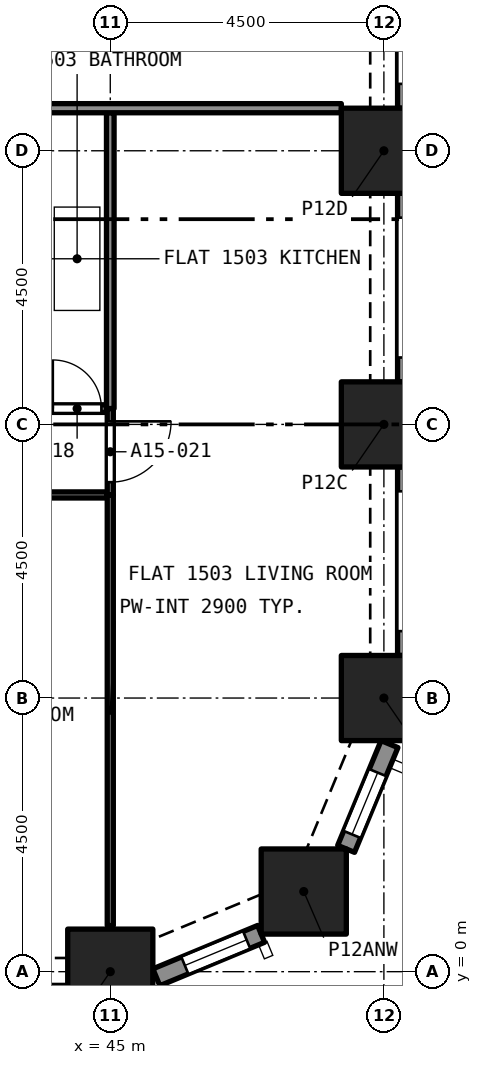
"""IFC4 building model, lengths in metres.
Left out: names, types, materials, properties, quantities, classifications, styles, units other than length and angle.
Written with IfcOpenShell. Run it as: python <this file> out.ifc"""

import sys

from ifc_helpers import new_model, si_unit, direction, frame, frame_2d, origin, origin_2d, place, context, subcontext, project, spatial, rectangle, extrude, element, fill, save


model = new_model("IFC4")
c1 = context("Model", 3, precision=1e-05, world=origin(), true_north=direction((0.0, 1.0)))
c2 = subcontext(c1, "Body", "Model", "MODEL_VIEW")
j1 = project(units=[si_unit("LENGTHUNIT", "METRE"), si_unit("PLANEANGLEUNIT", "RADIAN")], contexts=[c1])
p1 = place(None, origin())
s1 = spatial("IfcSite", under=j1, at=p1, CompositionType="ELEMENT")
p2 = place(p1, origin())
s2 = spatial("IfcBuilding", under=s1, at=p2, CompositionType="ELEMENT")
p3 = place(p2, frame((0.0, 0.0, 59.2)))
s3 = spatial("IfcBuildingStorey", under=s2, at=p3, CompositionType="ELEMENT", Elevation=59.2)
for number, where, z_axis, x_axis in (
    (1, (45.0, 0.0, 0.0), (0.0, 0.0, 1.0), (1.0, 0.0, 0.0)),
    (2, (48.182, 1.318, 0.0), (0.0, 0.0, 1.0), (1.0, 0.0, 0.0)),
    (3, (49.5, 4.5, 0.0), (0.0, 0.0, 1.0), (1.0, 0.0, 0.0)),
    (4, (49.5, 9.0, 0.0), (0.0, 0.0, 1.0), (1.0, 0.0, 0.0)),
    (5, (49.5, 13.5, 0.0), (0.0, 0.0, 1.0), (1.0, 0.0, 0.0)),
):
    element("IfcColumn", number, at=place(p3, frame(where, z_axis=z_axis, x_axis=x_axis)), inside=s3, PredefinedType="COLUMN", context=c2, shape_type="SweptSolid", body=[
        extrude(rectangle(XDim=1.4, YDim=1.4, at=origin_2d()), origin(), (0.0, 0.0, 1.0), 3.2),
    ])
p4 = place(p3, frame((47.48, 0.622, 0.0), z_axis=(0.0, 0.0, 1.0), x_axis=(-0.923903565336, -0.38262540684, 0.0)))
e6 = element("IfcWall", 6, at=p4, inside=s3, PredefinedType="SOLIDWALL", context=c2, shape_type="SweptSolid", body=[
    extrude(rectangle(XDim=1.865, YDim=0.3, at=frame_2d((0.933, 0.0))), origin(), (0.0, 0.0, 1.0), 3.2),
])
p5 = place(p4, frame((0.258, 0.0, 0.45)))
e7 = element("IfcOpeningElement", 7, at=p5, cuts=e6, PredefinedType="OPENING", context=c2, shape_type="SweptSolid", body=[
    extrude(rectangle(XDim=1.1, YDim=1.95, at=frame_2d((0.55, 0.975))), frame((0.0, 0.16, 0.0), z_axis=(0.0, -1.0, 0.0), x_axis=(1.0, 0.0, 0.0)), (0.0, 0.0, 1.0), 0.32),
])
p6 = place(p3, frame((49.592, 3.743, 0.0), z_axis=(0.0, 0.0, 1.0), x_axis=(-0.382737135771, -0.923857286003, 0.0)))
e8 = element("IfcWall", 8, at=p6, inside=s3, PredefinedType="SOLIDWALL", context=c2, shape_type="SweptSolid", body=[
    extrude(rectangle(XDim=1.865, YDim=0.3, at=frame_2d((0.933, 0.0))), origin(), (0.0, 0.0, 1.0), 3.2),
])
p7 = place(p6, frame((0.508, 0.0, 0.45)))
e9 = element("IfcOpeningElement", 9, at=p7, cuts=e8, PredefinedType="OPENING", context=c2, shape_type="SweptSolid", body=[
    extrude(rectangle(XDim=1.1, YDim=1.95, at=frame_2d((0.55, 0.975))), frame((0.0, 0.16, 0.0), z_axis=(0.0, -1.0, 0.0), x_axis=(1.0, 0.0, 0.0)), (0.0, 0.0, 1.0), 0.32),
])
p8 = place(p3, frame((49.875, 8.3, 0.0), z_axis=(0.0, 0.0, 1.0), x_axis=(0.0, -1.0, 0.0)))
e10 = element("IfcWall", 10, at=p8, inside=s3, PredefinedType="SOLIDWALL", context=c2, shape_type="SweptSolid", body=[
    extrude(rectangle(XDim=3.1, YDim=0.3, at=frame_2d((1.55, 0.0))), origin(), (0.0, 0.0, 1.0), 3.2),
])
p9 = place(p8, frame((0.4, 0.0, 0.45)))
e11 = element("IfcOpeningElement", 11, at=p9, cuts=e10, PredefinedType="OPENING", context=c2, shape_type="SweptSolid", body=[
    extrude(rectangle(XDim=2.3, YDim=1.95, at=frame_2d((1.15, 0.975))), frame((0.0, 0.16, 0.0), z_axis=(0.0, -1.0, 0.0), x_axis=(1.0, 0.0, 0.0)), (0.0, 0.0, 1.0), 0.32),
])
p10 = place(p3, frame((49.875, 12.8, 0.0), z_axis=(0.0, 0.0, 1.0), x_axis=(0.0, -1.0, 0.0)))
e12 = element("IfcWall", 12, at=p10, inside=s3, PredefinedType="SOLIDWALL", context=c2, shape_type="SweptSolid", body=[
    extrude(rectangle(XDim=3.1, YDim=0.3, at=frame_2d((1.55, 0.0))), origin(), (0.0, 0.0, 1.0), 3.2),
])
p11 = place(p10, frame((0.4, 0.0, 0.45)))
e13 = element("IfcOpeningElement", 13, at=p11, cuts=e12, PredefinedType="OPENING", context=c2, shape_type="SweptSolid", body=[
    extrude(rectangle(XDim=2.3, YDim=1.95, at=frame_2d((1.15, 0.975))), frame((0.0, 0.16, 0.0), z_axis=(0.0, -1.0, 0.0), x_axis=(1.0, 0.0, 0.0)), (0.0, 0.0, 1.0), 0.32),
])
p12 = place(p3, frame((49.875, 17.3, 0.0), z_axis=(0.0, 0.0, 1.0), x_axis=(0.0, -1.0, 0.0)))
e14 = element("IfcWall", 14, at=p12, inside=s3, PredefinedType="SOLIDWALL", context=c2, shape_type="SweptSolid", body=[
    extrude(rectangle(XDim=3.1, YDim=0.3, at=frame_2d((1.55, 0.0))), origin(), (0.0, 0.0, 1.0), 3.2),
])
p13 = place(p12, frame((0.4, 0.0, 0.45)))
e15 = element("IfcOpeningElement", 15, at=p13, cuts=e14, PredefinedType="OPENING", context=c2, shape_type="SweptSolid", body=[
    extrude(rectangle(XDim=2.3, YDim=1.95, at=frame_2d((1.15, 0.975))), frame((0.0, 0.16, 0.0), z_axis=(0.0, -1.0, 0.0), x_axis=(1.0, 0.0, 0.0)), (0.0, 0.0, 1.0), 0.32),
])
p14 = place(p3, frame((43.909, 9.26, 0.0), z_axis=(0.0, 0.0, 1.0), x_axis=(1.0, 0.0, 0.0)))
e16 = element("IfcWall", 16, at=p14, inside=s3, PredefinedType="PARTITIONING", context=c2, shape_type="SweptSolid", body=[
    extrude(rectangle(XDim=1.028, YDim=0.125, at=frame_2d((0.514, 0.0))), origin(), (0.0, 0.0, 1.0), 2.9),
])
p15 = place(p14, frame((0.146, 0.0, 0.0)))
e17 = element("IfcOpeningElement", 17, at=p15, cuts=e16, PredefinedType="OPENING", context=c2, shape_type="SweptSolid", body=[
    extrude(rectangle(XDim=0.8, YDim=2.1, at=frame_2d((0.4, 1.05))), frame((0.0, 0.073, 0.0), z_axis=(0.0, -1.0, 0.0), x_axis=(1.0, 0.0, 0.0)), (0.0, 0.0, 1.0), 0.145),
])
p16 = place(p3, frame((45.0, 9.26, 0.0), z_axis=(0.0, 0.0, 1.0), x_axis=(0.0, 1.0, 0.0)))
e18 = element("IfcWall", 18, at=p16, inside=s3, PredefinedType="PARTITIONING", context=c2, shape_type="SweptSolid", body=[
    extrude(rectangle(XDim=4.865, YDim=0.125, at=frame_2d((2.433, 0.0))), origin(), (0.0, 0.0, 1.0), 2.9),
])
p17 = place(p3, frame((44.95, 7.84, 0.0), z_axis=(0.0, 0.0, 1.0), x_axis=(-1.0, 0.0, 0.0)))
e19 = element("IfcWall", 19, at=p17, inside=s3, PredefinedType="PARTITIONING", context=c2, shape_type="SweptSolid", body=[
    extrude(rectangle(XDim=4.35, YDim=0.1, at=frame_2d((2.175, 0.0))), origin(), (0.0, 0.0, 1.0), 2.9),
])
p18 = place(p17, frame((1.75, 0.0, 0.0)))
e20 = element("IfcOpeningElement", 20, at=p18, cuts=e19, PredefinedType="OPENING", context=c2, shape_type="SweptSolid", body=[
    extrude(rectangle(XDim=0.9, YDim=2.1, at=frame_2d((0.45, 1.05))), frame((0.0, 0.06, 0.0), z_axis=(0.0, -1.0, 0.0), x_axis=(1.0, 0.0, 0.0)), (0.0, 0.0, 1.0), 0.12),
])
p19 = place(p3, frame((45.0, 0.758, 0.0), z_axis=(0.0, 0.0, 1.0), x_axis=(0.0, 1.0, 0.0)))
e21 = element("IfcWall", 21, at=p19, inside=s3, PredefinedType="PARTITIONING", context=c2, shape_type="SweptSolid", body=[
    extrude(rectangle(XDim=7.083, YDim=0.1, at=frame_2d((3.541, 0.0))), origin(), (0.0, 0.0, 1.0), 2.9),
])
p20 = place(p3, frame((45.0, 9.26, 0.0), z_axis=(0.0, 0.0, 1.0), x_axis=(0.0, -1.0, 0.0)))
e22 = element("IfcWall", 22, at=p20, inside=s3, PredefinedType="PARTITIONING", context=c2, shape_type="SweptSolid", body=[
    extrude(rectangle(XDim=1.42, YDim=0.1, at=frame_2d((0.71, 0.0))), origin(), (0.0, 0.0, 1.0), 2.9),
])
p21 = place(p20, frame((0.21, 0.0, 0.0)))
e23 = element("IfcOpeningElement", 23, at=p21, cuts=e22, PredefinedType="OPENING", context=c2, shape_type="SweptSolid", body=[
    extrude(rectangle(XDim=1.0, YDim=2.1, at=frame_2d((0.5, 1.05))), frame((0.0, 0.06, 0.0), z_axis=(0.0, -1.0, 0.0), x_axis=(1.0, 0.0, 0.0)), (0.0, 0.0, 1.0), 0.12),
])
p22 = place(p3, frame((42.6, 14.2, 0.0), z_axis=(0.0, 0.0, 1.0), x_axis=(1.0, 0.0, 0.0)))
e24 = element("IfcWall", 24, at=p22, inside=s3, PredefinedType="PARTITIONING", context=c2, shape_type="SweptSolid", body=[
    extrude(rectangle(XDim=6.2, YDim=0.15, at=frame_2d((3.1, 0.0))), origin(), (0.0, 0.0, 1.0), 2.9),
])
p23 = place(p5, origin())
e25 = element("IfcWindow", 25, at=p23, inside=s3, PartitioningType="SINGLE_PANEL", PredefinedType="WINDOW", context=c2, shape_type="SweptSolid", body=[
    extrude(rectangle(XDim=1.1, YDim=1.95, at=frame_2d((0.55, 0.975))), frame((0.0, 0.03, 0.0), z_axis=(0.0, -1.0, 0.0), x_axis=(1.0, 0.0, 0.0)), (0.0, 0.0, 1.0), 0.06),
])
fill(e7, e25)
p24 = place(p7, origin())
e26 = element("IfcWindow", 26, at=p24, inside=s3, PartitioningType="SINGLE_PANEL", PredefinedType="WINDOW", context=c2, shape_type="SweptSolid", body=[
    extrude(rectangle(XDim=1.1, YDim=1.95, at=frame_2d((0.55, 0.975))), frame((0.0, 0.03, 0.0), z_axis=(0.0, -1.0, 0.0), x_axis=(1.0, 0.0, 0.0)), (0.0, 0.0, 1.0), 0.06),
])
fill(e9, e26)
p25 = place(p15, origin())
e27 = element("IfcDoor", 27, at=p25, inside=s3, OperationType="SINGLE_SWING_RIGHT", PredefinedType="DOOR", context=c2, shape_type="SweptSolid", body=[
    extrude(rectangle(XDim=0.8, YDim=2.1, at=frame_2d((0.4, 1.05))), frame((0.0, 0.025, 0.0), z_axis=(0.0, -1.0, 0.0), x_axis=(1.0, 0.0, 0.0)), (0.0, 0.0, 1.0), 0.05),
])
fill(e17, e27)
p26 = place(p21, origin())
e28 = element("IfcDoor", 28, at=p26, inside=s3, OperationType="SINGLE_SWING_RIGHT", PredefinedType="DOOR", context=c2, shape_type="SweptSolid", body=[
    extrude(rectangle(XDim=1.0, YDim=2.1, at=frame_2d((0.5, 1.05))), frame((0.0, 0.025, 0.0), z_axis=(0.0, -1.0, 0.0), x_axis=(1.0, 0.0, 0.0)), (0.0, 0.0, 1.0), 0.05),
])
fill(e23, e28)
save(model, sys.argv[1])
